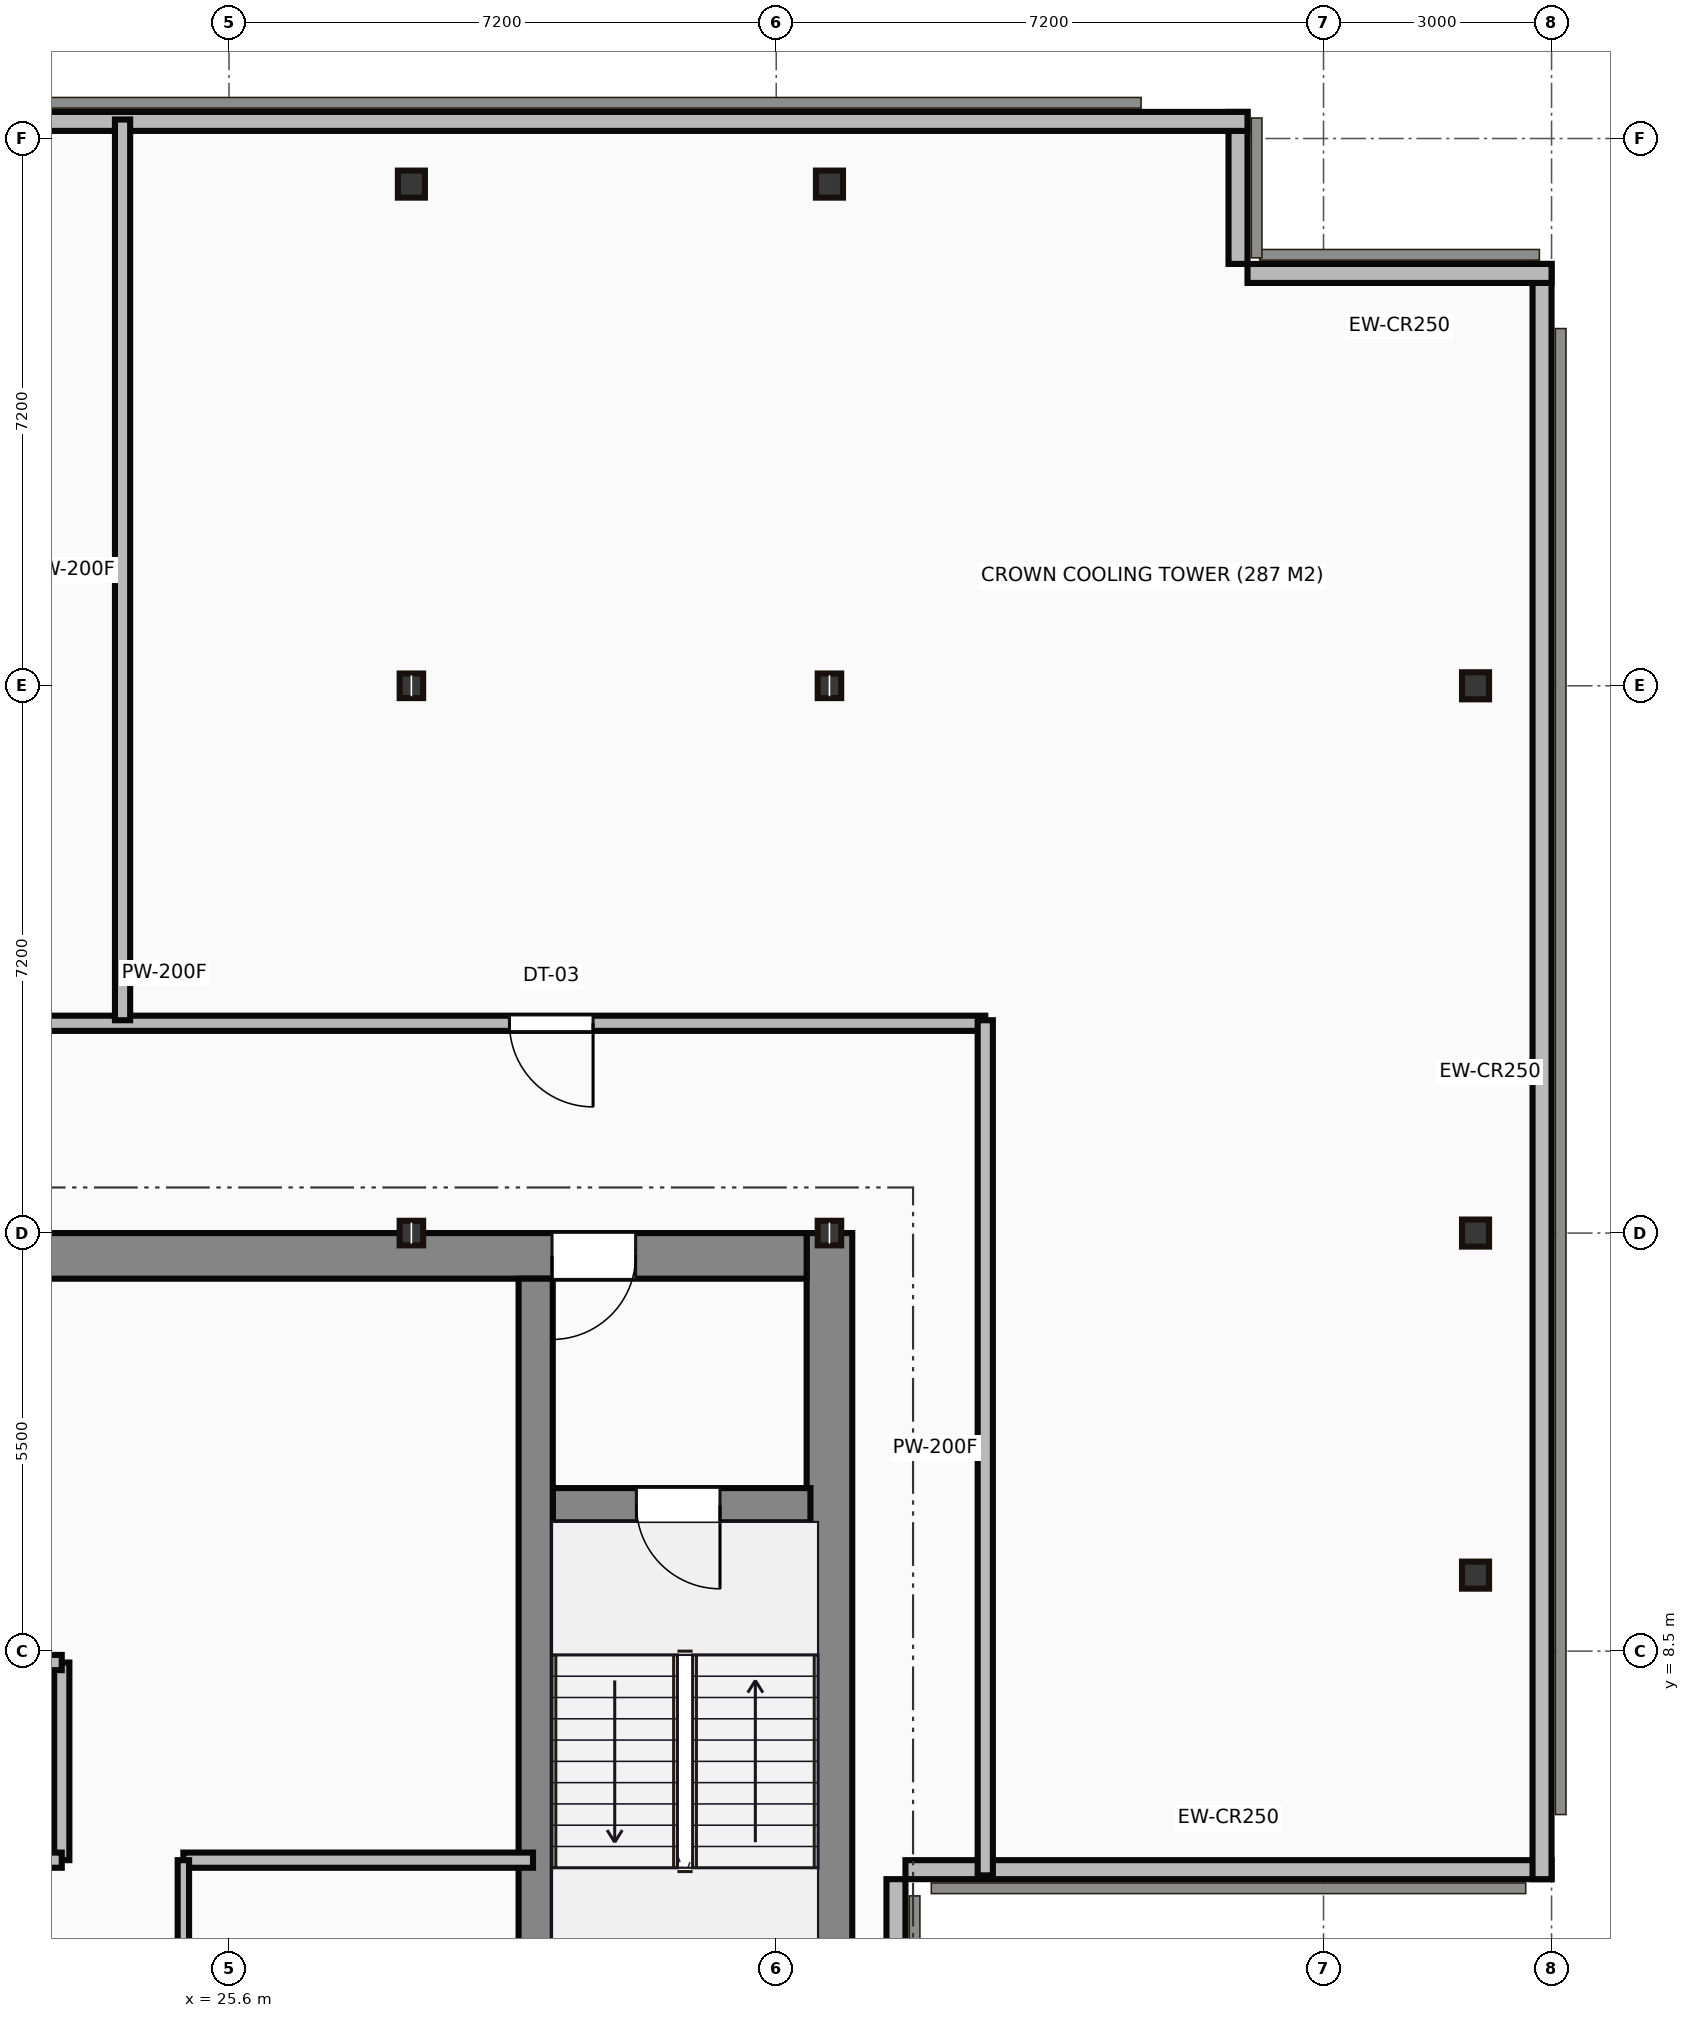
"""IFC4 building model, lengths in metres.
Left out: names, types, materials, properties, quantities, classifications, styles, units other than length and angle.
Written with IfcOpenShell. Run it as: python <this file> out.ifc"""

import sys

from ifc_helpers import new_model, si_unit, direction, frame, frame_2d, origin, origin_2d, place, context, subcontext, project, spatial, rectangle, hollow_rectangle, i_section, extrude, source, transform, mapped, element, fill, save


model = new_model("IFC4")
c1 = context("Model", 3, precision=1e-05, world=origin(), true_north=direction((0.0, 1.0)))
c2 = subcontext(c1, "Body", "Model", "MODEL_VIEW")
j1 = project(units=[si_unit("LENGTHUNIT", "METRE"), si_unit("PLANEANGLEUNIT", "RADIAN")], contexts=[c1])
p1 = place(None, origin())
s1 = spatial("IfcSite", under=j1, at=p1, CompositionType="ELEMENT")
p2 = place(p1, origin())
s2 = spatial("IfcBuilding", under=s1, at=p2, CompositionType="ELEMENT")
p3 = place(p2, frame((0.0, 0.0, 296.05)))
s3 = spatial("IfcBuildingStorey", under=s2, at=p3, CompositionType="ELEMENT", Elevation=296.05)
m1 = source(origin(), c2, "Body", "SweptSolid", [
    extrude(rectangle(XDim=13.1, YDim=0.6, at=frame_2d((6.55, 0.0))), origin(), (0.0, 0.0, 1.0), 3.8),
])
p4 = place(p3, frame((33.5, 0.9, 0.0), z_axis=(0.0, 0.0, 1.0), x_axis=(0.0, 1.0, 0.0)))
e1 = element("IfcWall", 1, at=p4, inside=s3, PredefinedType="SHEAR", context=c2, shape_type="MappedRepresentation", body=[
    mapped(m1, transform((0.0, 0.0, 0.0))),
])
m2 = source(origin(), c2, "Body", "SweptSolid", [
    extrude(rectangle(XDim=12.6, YDim=0.6, at=frame_2d((6.3, 0.0))), origin(), (0.0, 0.0, 1.0), 3.8),
])
p5 = place(p3, frame((20.6, 13.7, 0.0), z_axis=(0.0, 0.0, 1.0), x_axis=(1.0, 0.0, 0.0)))
e2 = element("IfcWall", 2, at=p5, inside=s3, PredefinedType="SHEAR", context=c2, shape_type="MappedRepresentation", body=[
    mapped(m2, transform((0.0, 0.0, 0.0))),
])
p6 = place(p5, frame((9.25, 0.0, 0.0)))
e3 = element("IfcOpeningElement", 3, at=p6, cuts=e2, PredefinedType="OPENING", context=c2, shape_type="SweptSolid", body=[
    extrude(rectangle(XDim=1.1, YDim=2.15, at=frame_2d((0.55, 1.075))), frame((0.0, 0.31, 0.0), z_axis=(0.0, -1.0, 0.0), x_axis=(1.0, 0.0, 0.0)), (0.0, 0.0, 1.0), 0.62),
])
m3 = source(origin(), c2, "Body", "SweptSolid", [
    extrude(rectangle(XDim=12.5, YDim=0.45, at=frame_2d((6.25, 0.0))), origin(), (0.0, 0.0, 1.0), 3.8),
])
p7 = place(p3, frame((29.635, 0.9, 0.0), z_axis=(0.0, 0.0, 1.0), x_axis=(0.0, 1.0, 0.0)))
e4 = element("IfcWall", 4, at=p7, inside=s3, PredefinedType="SHEAR", context=c2, shape_type="MappedRepresentation", body=[
    mapped(m3, transform((0.0, 0.0, 0.0))),
])
m4 = source(origin(), c2, "Body", "SweptSolid", [
    extrude(rectangle(XDim=3.39, YDim=0.45, at=frame_2d((1.695, 0.0))), origin(), (0.0, 0.0, 1.0), 3.8),
])
p8 = place(p3, frame((29.86, 10.42, 0.0), z_axis=(0.0, 0.0, 1.0), x_axis=(1.0, 0.0, 0.0)))
e5 = element("IfcWall", 5, at=p8, inside=s3, PredefinedType="SHEAR", context=c2, shape_type="MappedRepresentation", body=[
    mapped(m4, transform((0.0, 0.0, 0.0))),
])
p9 = place(p8, frame((1.1, 0.0, 0.0)))
e6 = element("IfcOpeningElement", 6, at=p9, cuts=e5, PredefinedType="OPENING", context=c2, shape_type="SweptSolid", body=[
    extrude(rectangle(XDim=1.1, YDim=2.15, at=frame_2d((0.55, 1.075))), frame((0.0, 0.235, 0.0), z_axis=(0.0, -1.0, 0.0), x_axis=(1.0, 0.0, 0.0)), (0.0, 0.0, 1.0), 0.47),
])
m5 = source(origin(), c2, "Body", "SweptSolid", [
    extrude(i_section(OverallWidth=0.309, OverallDepth=0.323, WebThickness=0.014, FlangeThickness=0.023, at=origin_2d()), origin(), (0.0, 0.0, 1.0), 3.8),
])
for number, where, z_axis, x_axis in (
    (7, (28.0, 14.0, 0.0), (0.0, 0.0, 1.0), (1.0, 0.0, 0.0)),
    (8, (28.0, 21.2, 0.0), (0.0, 0.0, 1.0), (1.0, 0.0, 0.0)),
):
    element("IfcColumn", number, at=place(p3, frame(where, z_axis=z_axis, x_axis=x_axis)), inside=s3, PredefinedType="COLUMN", context=c2, shape_type="MappedRepresentation", body=[
        mapped(m5, transform((0.0, 0.0, 0.0))),
    ])
m6 = source(origin(), c2, "Body", "SweptSolid", [
    extrude(hollow_rectangle(XDim=0.356, YDim=0.356, WallThickness=0.019, at=origin_2d()), origin(), (0.0, 0.0, 1.0), 3.8),
])
p10 = place(p3, frame((28.0, 27.8, 0.0), z_axis=(0.0, 0.0, 1.0), x_axis=(1.0, 0.0, 0.0)))
e9 = element("IfcColumn", 9, at=p10, inside=s3, PredefinedType="COLUMN", context=c2, shape_type="MappedRepresentation", body=[
    mapped(m6, transform((0.0, 0.0, 0.0))),
])
for number, where, z_axis, x_axis in (
    (10, (33.5, 14.0, 0.0), (0.0, 0.0, 1.0), (1.0, 0.0, 0.0)),
    (11, (33.5, 21.2, 0.0), (0.0, 0.0, 1.0), (1.0, 0.0, 0.0)),
):
    element("IfcColumn", number, at=place(p3, frame(where, z_axis=z_axis, x_axis=x_axis)), inside=s3, PredefinedType="COLUMN", context=c2, shape_type="MappedRepresentation", body=[
        mapped(m5, transform((0.0, 0.0, 0.0))),
    ])
for number, where, z_axis, x_axis in (
    (12, (33.5, 27.8, 0.0), (0.0, 0.0, 1.0), (1.0, 0.0, 0.0)),
    (13, (42.0, 9.5, 0.0), (0.0, 0.0, 1.0), (1.0, 0.0, 0.0)),
    (14, (42.0, 14.0, 0.0), (0.0, 0.0, 1.0), (1.0, 0.0, 0.0)),
    (15, (42.0, 21.2, 0.0), (0.0, 0.0, 1.0), (1.0, 0.0, 0.0)),
):
    element("IfcColumn", number, at=place(p3, frame(where, z_axis=z_axis, x_axis=x_axis)), inside=s3, PredefinedType="COLUMN", context=c2, shape_type="MappedRepresentation", body=[
        mapped(m6, transform((0.0, 0.0, 0.0))),
    ])
m7 = source(origin(), c2, "Body", "SweptSolid", [
    extrude(rectangle(XDim=5.5, YDim=0.25, at=frame_2d((2.75, 0.0))), origin(), (0.0, 0.0, 1.0), 3.5),
])
p11 = place(p3, frame((34.375, 0.0, 0.0), z_axis=(0.0, 0.0, 1.0), x_axis=(0.0, 1.0, 0.0)))
e16 = element("IfcWall", 16, at=p11, inside=s3, PredefinedType="STANDARD", context=c2, shape_type="MappedRepresentation", body=[
    mapped(m7, transform((0.0, 0.0, 0.0))),
])
m8 = source(origin(), c2, "Body", "SweptSolid", [
    extrude(rectangle(XDim=8.5, YDim=0.25, at=frame_2d((4.25, 0.0))), origin(), (0.0, 0.0, 1.0), 3.5),
])
p12 = place(p3, frame((34.5, 5.625, 0.0), z_axis=(0.0, 0.0, 1.0), x_axis=(1.0, 0.0, 0.0)))
e17 = element("IfcWall", 17, at=p12, inside=s3, PredefinedType="STANDARD", context=c2, shape_type="MappedRepresentation", body=[
    mapped(m8, transform((0.0, 0.0, 0.0))),
])
m9 = source(origin(), c2, "Body", "SweptSolid", [
    extrude(rectangle(XDim=21.25, YDim=0.25, at=frame_2d((10.625, 0.0))), origin(), (0.0, 0.0, 1.0), 3.5),
])
p13 = place(p3, frame((42.875, 5.5, 0.0), z_axis=(0.0, 0.0, 1.0), x_axis=(0.0, 1.0, 0.0)))
e18 = element("IfcWall", 18, at=p13, inside=s3, PredefinedType="STANDARD", context=c2, shape_type="MappedRepresentation", body=[
    mapped(m9, transform((0.0, 0.0, 0.0))),
])
m10 = source(origin(), c2, "Body", "SweptSolid", [
    extrude(rectangle(XDim=4.0, YDim=0.25, at=frame_2d((2.0, 0.0))), origin(), (0.0, 0.0, 1.0), 3.5),
])
p14 = place(p3, frame((43.0, 26.625, 0.0), z_axis=(0.0, 0.0, 1.0), x_axis=(-1.0, 0.0, 0.0)))
e19 = element("IfcWall", 19, at=p14, inside=s3, PredefinedType="STANDARD", context=c2, shape_type="MappedRepresentation", body=[
    mapped(m10, transform((0.0, 0.0, 0.0))),
])
m11 = source(origin(), c2, "Body", "SweptSolid", [
    extrude(rectangle(XDim=2.0, YDim=0.25, at=frame_2d((1.0, 0.0))), origin(), (0.0, 0.0, 1.0), 3.5),
])
p15 = place(p3, frame((38.875, 26.75, 0.0), z_axis=(0.0, 0.0, 1.0), x_axis=(0.0, 1.0, 0.0)))
e20 = element("IfcWall", 20, at=p15, inside=s3, PredefinedType="STANDARD", context=c2, shape_type="MappedRepresentation", body=[
    mapped(m11, transform((0.0, 0.0, 0.0))),
])
m12 = source(origin(), c2, "Body", "SweptSolid", [
    extrude(rectangle(XDim=35.0, YDim=0.25, at=frame_2d((17.5, 0.0))), origin(), (0.0, 0.0, 1.0), 3.5),
])
p16 = place(p3, frame((39.0, 28.625, 0.0), z_axis=(0.0, 0.0, 1.0), x_axis=(-1.0, 0.0, 0.0)))
e21 = element("IfcWall", 21, at=p16, inside=s3, PredefinedType="STANDARD", context=c2, shape_type="MappedRepresentation", body=[
    mapped(m12, transform((0.0, 0.0, 0.0))),
])
m13 = source(origin(), c2, "Body", "SweptSolid", [
    extrude(rectangle(XDim=11.85, YDim=0.2, at=frame_2d((5.925, 0.0))), origin(), (0.0, 0.0, 1.0), 3.5),
])
p17 = place(p3, frame((11.55, 5.75, 0.0), z_axis=(0.0, 0.0, 1.0), x_axis=(1.0, 0.0, 0.0)))
e22 = element("IfcWall", 22, at=p17, inside=s3, PredefinedType="PARTITIONING", context=c2, shape_type="MappedRepresentation", body=[
    mapped(m13, transform((0.0, 0.0, 0.0))),
])
p18 = place(p17, frame((5.2, 0.0, 0.0)))
e23 = element("IfcOpeningElement", 23, at=p18, cuts=e22, PredefinedType="OPENING", context=c2, shape_type="SweptSolid", body=[
    extrude(rectangle(XDim=1.1, YDim=2.15, at=frame_2d((0.55, 1.075))), frame((0.0, 0.11, 0.0), z_axis=(0.0, -1.0, 0.0), x_axis=(1.0, 0.0, 0.0)), (0.0, 0.0, 1.0), 0.22),
])
p19 = place(p3, frame((11.55, 8.35, 0.0), z_axis=(0.0, 0.0, 1.0), x_axis=(1.0, 0.0, 0.0)))
e24 = element("IfcWall", 24, at=p19, inside=s3, PredefinedType="PARTITIONING", context=c2, shape_type="MappedRepresentation", body=[
    mapped(m13, transform((0.0, 0.0, 0.0))),
])
m14 = source(origin(), c2, "Body", "SweptSolid", [
    extrude(rectangle(XDim=2.6, YDim=0.2, at=frame_2d((1.3, 0.0))), origin(), (0.0, 0.0, 1.0), 3.5),
])
p20 = place(p3, frame((23.4, 5.75, 0.0), z_axis=(0.0, 0.0, 1.0), x_axis=(0.0, 1.0, 0.0)))
e25 = element("IfcWall", 25, at=p20, inside=s3, PredefinedType="PARTITIONING", context=c2, shape_type="MappedRepresentation", body=[
    mapped(m14, transform((0.0, 0.0, 0.0))),
])
m15 = source(origin(), c2, "Body", "SweptSolid", [
    extrude(rectangle(XDim=4.9, YDim=0.15, at=frame_2d((2.45, 0.0))), origin(), (0.0, 0.0, 1.0), 3.5),
])
p21 = place(p3, frame((25.0, 0.85, 0.0), z_axis=(0.0, 0.0, 1.0), x_axis=(0.0, 1.0, 0.0)))
e26 = element("IfcWall", 26, at=p21, inside=s3, PredefinedType="PARTITIONING", context=c2, shape_type="MappedRepresentation", body=[
    mapped(m15, transform((0.0, 0.0, 0.0))),
])
p22 = place(p21, frame((2.4, 0.0, 0.0)))
e27 = element("IfcOpeningElement", 27, at=p22, cuts=e26, PredefinedType="OPENING", context=c2, shape_type="SweptSolid", body=[
    extrude(rectangle(XDim=0.95, YDim=2.15, at=frame_2d((0.475, 1.075))), frame((0.0, 0.085, 0.0), z_axis=(0.0, -1.0, 0.0), x_axis=(1.0, 0.0, 0.0)), (0.0, 0.0, 1.0), 0.17),
])
m16 = source(origin(), c2, "Body", "SweptSolid", [
    extrude(rectangle(XDim=4.6, YDim=0.2, at=frame_2d((2.3, 0.0))), origin(), (0.0, 0.0, 1.0), 3.5),
])
p23 = place(p3, frame((25.0, 5.75, 0.0), z_axis=(0.0, 0.0, 1.0), x_axis=(1.0, 0.0, 0.0)))
e28 = element("IfcWall", 28, at=p23, inside=s3, PredefinedType="PARTITIONING", context=c2, shape_type="MappedRepresentation", body=[
    mapped(m16, transform((0.0, 0.0, 0.0))),
])
m17 = source(origin(), c2, "Body", "SweptSolid", [
    extrude(rectangle(XDim=21.6, YDim=0.2, at=frame_2d((10.8, 0.0))), origin(), (0.0, 0.0, 1.0), 3.5),
])
p24 = place(p3, frame((13.95, 16.76, 0.0), z_axis=(0.0, 0.0, 1.0), x_axis=(1.0, 0.0, 0.0)))
e29 = element("IfcWall", 29, at=p24, inside=s3, PredefinedType="PARTITIONING", context=c2, shape_type="MappedRepresentation", body=[
    mapped(m17, transform((0.0, 0.0, 0.0))),
])
p25 = place(p24, frame((4.57, 0.0, 0.0)))
e30 = element("IfcOpeningElement", 30, at=p25, cuts=e29, PredefinedType="OPENING", context=c2, shape_type="SweptSolid", body=[
    extrude(rectangle(XDim=1.1, YDim=2.15, at=frame_2d((0.55, 1.075))), frame((0.0, 0.11, 0.0), z_axis=(0.0, -1.0, 0.0), x_axis=(1.0, 0.0, 0.0)), (0.0, 0.0, 1.0), 0.22),
])
p26 = place(p24, frame((15.34, 0.0, 0.0)))
e31 = element("IfcOpeningElement", 31, at=p26, cuts=e29, PredefinedType="OPENING", context=c2, shape_type="SweptSolid", body=[
    extrude(rectangle(XDim=1.1, YDim=2.15, at=frame_2d((0.55, 1.075))), frame((0.0, 0.11, 0.0), z_axis=(0.0, -1.0, 0.0), x_axis=(1.0, 0.0, 0.0)), (0.0, 0.0, 1.0), 0.22),
])
m18 = source(origin(), c2, "Body", "SweptSolid", [
    extrude(rectangle(XDim=11.25, YDim=0.2, at=frame_2d((5.625, 0.0))), origin(), (0.0, 0.0, 1.0), 3.5),
])
p27 = place(p3, frame((35.55, 5.55, 0.0), z_axis=(0.0, 0.0, 1.0), x_axis=(0.0, 1.0, 0.0)))
e32 = element("IfcWall", 32, at=p27, inside=s3, PredefinedType="PARTITIONING", context=c2, shape_type="MappedRepresentation", body=[
    mapped(m18, transform((0.0, 0.0, 0.0))),
])
p28 = place(p3, frame((24.2, 16.8, 0.0), z_axis=(0.0, 0.0, 1.0), x_axis=(0.0, 1.0, 0.0)))
e33 = element("IfcWall", 33, at=p28, inside=s3, PredefinedType="PARTITIONING", context=c2, shape_type="MappedRepresentation", body=[
    mapped(m13, transform((0.0, 0.0, 0.0))),
])
m19 = source(origin(), c2, "Body", "SweptSolid", [
    extrude(rectangle(XDim=1.1, YDim=2.15, at=frame_2d((0.55, 1.075))), frame((0.0, 0.025, 0.0), z_axis=(0.0, -1.0, 0.0), x_axis=(1.0, 0.0, 0.0)), (0.0, 0.0, 1.0), 0.05),
])
p29 = place(p9, frame((1.1, 0.0, 0.0), z_axis=(0.0, 0.0, 1.0), x_axis=(-1.0, 0.0, 0.0)))
e34 = element("IfcDoor", 34, at=p29, inside=s3, OperationType="SINGLE_SWING_RIGHT", PredefinedType="DOOR", context=c2, shape_type="MappedRepresentation", body=[
    mapped(m19, transform((0.0, 0.0, 0.0))),
])
fill(e6, e34)
p30 = place(p6, origin())
e35 = element("IfcDoor", 35, at=p30, inside=s3, OperationType="SINGLE_SWING_LEFT", PredefinedType="DOOR", context=c2, shape_type="MappedRepresentation", body=[
    mapped(m19, transform((0.0, 0.0, 0.0))),
])
fill(e3, e35)
p31 = place(p26, origin())
e36 = element("IfcDoor", 36, at=p31, inside=s3, OperationType="SINGLE_SWING_RIGHT", PredefinedType="DOOR", context=c2, shape_type="MappedRepresentation", body=[
    mapped(m19, transform((0.0, 0.0, 0.0))),
])
fill(e31, e36)
save(model, sys.argv[1])
